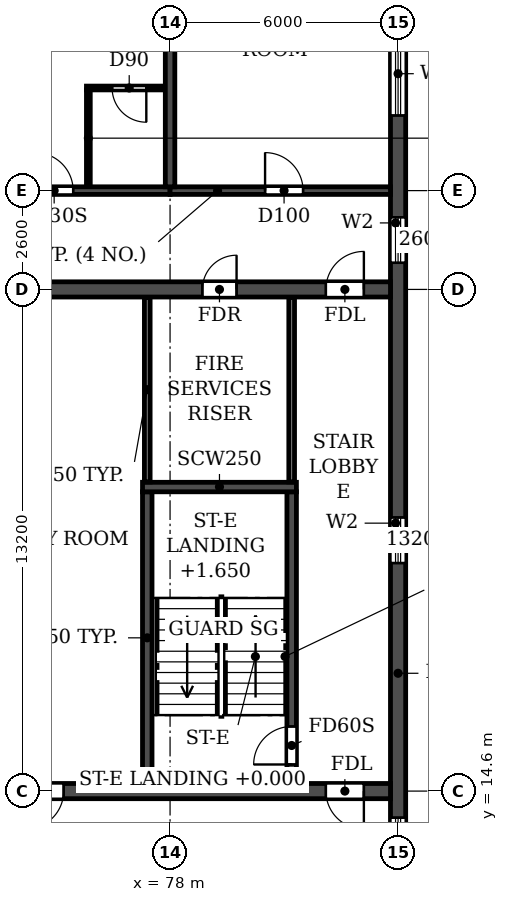
"""IFC4 building model, lengths in metres.
Left out: names, types, materials, properties, quantities, classifications, styles, units other than length and angle.
Written with IfcOpenShell. Run it as: python <this file> out.ifc"""

import sys

from ifc_helpers import new_model, si_unit, direction, frame, frame_2d, origin, place, context, subcontext, project, spatial, rectangle, extrude, element, fill, save


model = new_model("IFC4")
c1 = context("Model", 3, precision=1e-05, world=origin(), true_north=direction((0.0, 1.0)))
c2 = subcontext(c1, "Body", "Model", "MODEL_VIEW")
j1 = project(units=[si_unit("LENGTHUNIT", "METRE"), si_unit("PLANEANGLEUNIT", "RADIAN")], contexts=[c1])
p1 = place(None, origin())
s1 = spatial("IfcSite", under=j1, at=p1, CompositionType="ELEMENT")
p2 = place(p1, origin())
s2 = spatial("IfcBuilding", under=s1, at=p2, CompositionType="ELEMENT")
p3 = place(p2, frame((0.0, 0.0, 171.9)))
s3 = spatial("IfcBuildingStorey", under=s2, at=p3, CompositionType="ELEMENT", Elevation=171.9)
p4 = place(p3, frame((78.0, 30.5, 0.0), z_axis=(0.0, 0.0, 1.0), x_axis=(0.0, 1.0, 0.0)))
e1 = element("IfcWall", 1, at=p4, inside=s3, PredefinedType="SHEAR", context=c2, shape_type="SweptSolid", body=[
    extrude(rectangle(XDim=10.5, YDim=0.25, at=frame_2d((5.25, 0.0))), origin(), (0.0, 0.0, 1.0), 3.08),
])
p5 = place(p3, frame((84.0, 4.683, 0.0), z_axis=(0.0, 0.0, 1.0), x_axis=(0.0, 1.0, 0.0)))
e2 = element("IfcWall", 2, at=p5, inside=s3, PredefinedType="SHEAR", context=c2, shape_type="SweptSolid", body=[
    extrude(rectangle(XDim=31.834, YDim=0.4, at=frame_2d((15.917, 0.0))), origin(), (0.0, 0.0, 1.0), 3.08),
])
p6 = place(p5, frame((23.817, 0.0, 0.9)))
e3 = element("IfcOpeningElement", 3, at=p6, cuts=e2, PredefinedType="OPENING", context=c2, shape_type="SweptSolid", body=[
    extrude(rectangle(XDim=1.2, YDim=1.5, at=frame_2d((0.6, 0.75))), frame((0.0, 0.21, 0.0), z_axis=(0.0, -1.0, 0.0), x_axis=(1.0, 0.0, 0.0)), (0.0, 0.0, 1.0), 0.42),
])
p7 = place(p5, frame((8.017, 0.0, 0.9)))
e4 = element("IfcOpeningElement", 4, at=p7, cuts=e2, PredefinedType="OPENING", context=c2, shape_type="SweptSolid", body=[
    extrude(rectangle(XDim=1.2, YDim=1.5, at=frame_2d((0.6, 0.75))), frame((0.0, 0.21, 0.0), z_axis=(0.0, -1.0, 0.0), x_axis=(1.0, 0.0, 0.0)), (0.0, 0.0, 1.0), 0.42),
])
p8 = place(p5, frame((27.694, 0.0, 0.6)))
e5 = element("IfcOpeningElement", 5, at=p8, cuts=e2, PredefinedType="OPENING", context=c2, shape_type="SweptSolid", body=[
    extrude(rectangle(XDim=2.2, YDim=1.8, at=frame_2d((1.1, 0.9))), frame((0.0, 0.21, 0.0), z_axis=(0.0, -1.0, 0.0), x_axis=(1.0, 0.0, 0.0)), (0.0, 0.0, 1.0), 0.42),
])
p9 = place(p5, frame((2.541, 0.0, 0.6)))
e6 = element("IfcOpeningElement", 6, at=p9, cuts=e2, PredefinedType="OPENING", context=c2, shape_type="SweptSolid", body=[
    extrude(rectangle(XDim=2.2, YDim=1.8, at=frame_2d((1.1, 0.9))), frame((0.0, 0.21, 0.0), z_axis=(0.0, -1.0, 0.0), x_axis=(1.0, 0.0, 0.0)), (0.0, 0.0, 1.0), 0.42),
])
p10 = place(p5, frame((15.917, 0.0, 0.9)))
e7 = element("IfcOpeningElement", 7, at=p10, cuts=e2, PredefinedType="OPENING", context=c2, shape_type="SweptSolid", body=[
    extrude(rectangle(XDim=1.2, YDim=1.5, at=frame_2d((0.6, 0.75))), frame((0.0, 0.21, 0.0), z_axis=(0.0, -1.0, 0.0), x_axis=(1.0, 0.0, 0.0)), (0.0, 0.0, 1.0), 0.42),
])
p11 = place(p3, frame((72.0, 30.4, 0.0), z_axis=(0.0, 0.0, 1.0), x_axis=(1.0, 0.0, 0.0)))
e8 = element("IfcWall", 8, at=p11, inside=s3, PredefinedType="SHEAR", context=c2, shape_type="SweptSolid", body=[
    extrude(rectangle(XDim=6.0, YDim=0.2, at=frame_2d((3.0, 0.0))), origin(), (0.0, 0.0, 1.0), 2.48),
])
p12 = place(p11, frame((2.45, 0.0, 0.0)))
e9 = element("IfcOpeningElement", 9, at=p12, cuts=e8, PredefinedType="OPENING", context=c2, shape_type="SweptSolid", body=[
    extrude(rectangle(XDim=1.0, YDim=2.1, at=frame_2d((0.5, 1.05))), frame((0.0, 0.11, 0.0), z_axis=(0.0, -1.0, 0.0), x_axis=(1.0, 0.0, 0.0)), (0.0, 0.0, 1.0), 0.22),
])
p13 = place(p3, frame((78.0, 30.4, 0.0), z_axis=(0.0, 0.0, 1.0), x_axis=(1.0, 0.0, 0.0)))
e10 = element("IfcWall", 10, at=p13, inside=s3, PredefinedType="SHEAR", context=c2, shape_type="SweptSolid", body=[
    extrude(rectangle(XDim=5.8, YDim=0.2, at=frame_2d((2.9, 0.0))), origin(), (0.0, 0.0, 1.0), 2.48),
])
p14 = place(p13, frame((2.5, 0.0, 0.0)))
e11 = element("IfcOpeningElement", 11, at=p14, cuts=e10, PredefinedType="OPENING", context=c2, shape_type="SweptSolid", body=[
    extrude(rectangle(XDim=1.0, YDim=2.1, at=frame_2d((0.5, 1.05))), frame((0.0, 0.11, 0.0), z_axis=(0.0, -1.0, 0.0), x_axis=(1.0, 0.0, 0.0)), (0.0, 0.0, 1.0), 0.22),
])
p15 = place(p3, frame((18.2, 14.6, 0.0), z_axis=(0.0, 0.0, 1.0), x_axis=(1.0, 0.0, 0.0)))
e12 = element("IfcWall", 12, at=p15, inside=s3, PredefinedType="SOLIDWALL", context=c2, shape_type="SweptSolid", body=[
    extrude(rectangle(XDim=65.6, YDim=0.4, at=frame_2d((32.8, 0.0))), origin(), (0.0, 0.0, 1.0), 3.08),
])
p16 = place(p15, frame((0.7, 0.0, 0.0)))
e13 = element("IfcOpeningElement", 13, at=p16, cuts=e12, PredefinedType="OPENING", context=c2, shape_type="SweptSolid", body=[
    extrude(rectangle(XDim=1.0, YDim=2.1, at=frame_2d((0.5, 1.05))), frame((0.0, 0.21, 0.0), z_axis=(0.0, -1.0, 0.0), x_axis=(1.0, 0.0, 0.0)), (0.0, 0.0, 1.0), 0.42),
])
p17 = place(p15, frame((8.6, 0.0, 0.0)))
e14 = element("IfcOpeningElement", 14, at=p17, cuts=e12, PredefinedType="OPENING", context=c2, shape_type="SweptSolid", body=[
    extrude(rectangle(XDim=1.0, YDim=2.1, at=frame_2d((0.5, 1.05))), frame((0.0, 0.21, 0.0), z_axis=(0.0, -1.0, 0.0), x_axis=(1.0, 0.0, 0.0)), (0.0, 0.0, 1.0), 0.42),
])
p18 = place(p15, frame((13.2, 0.0, 0.0)))
e15 = element("IfcOpeningElement", 15, at=p18, cuts=e12, PredefinedType="OPENING", context=c2, shape_type="SweptSolid", body=[
    extrude(rectangle(XDim=1.0, YDim=2.1, at=frame_2d((0.5, 1.05))), frame((0.0, 0.21, 0.0), z_axis=(0.0, -1.0, 0.0), x_axis=(1.0, 0.0, 0.0)), (0.0, 0.0, 1.0), 0.42),
])
p19 = place(p15, frame((25.8, 0.0, 0.0)))
e16 = element("IfcOpeningElement", 16, at=p19, cuts=e12, PredefinedType="OPENING", context=c2, shape_type="SweptSolid", body=[
    extrude(rectangle(XDim=1.0, YDim=2.1, at=frame_2d((0.5, 1.05))), frame((0.0, 0.21, 0.0), z_axis=(0.0, -1.0, 0.0), x_axis=(1.0, 0.0, 0.0)), (0.0, 0.0, 1.0), 0.42),
])
p20 = place(p15, frame((29.7, 0.0, 0.0)))
e17 = element("IfcOpeningElement", 17, at=p20, cuts=e12, PredefinedType="OPENING", context=c2, shape_type="SweptSolid", body=[
    extrude(rectangle(XDim=1.0, YDim=2.1, at=frame_2d((0.5, 1.05))), frame((0.0, 0.21, 0.0), z_axis=(0.0, -1.0, 0.0), x_axis=(1.0, 0.0, 0.0)), (0.0, 0.0, 1.0), 0.42),
])
p21 = place(p15, frame((32.3, 0.0, 0.0)))
e18 = element("IfcOpeningElement", 18, at=p21, cuts=e12, PredefinedType="OPENING", context=c2, shape_type="SweptSolid", body=[
    extrude(rectangle(XDim=1.0, YDim=2.1, at=frame_2d((0.5, 1.05))), frame((0.0, 0.21, 0.0), z_axis=(0.0, -1.0, 0.0), x_axis=(1.0, 0.0, 0.0)), (0.0, 0.0, 1.0), 0.42),
])
p22 = place(p15, frame((37.5, 0.0, 0.0)))
e19 = element("IfcOpeningElement", 19, at=p22, cuts=e12, PredefinedType="OPENING", context=c2, shape_type="SweptSolid", body=[
    extrude(rectangle(XDim=1.0, YDim=2.1, at=frame_2d((0.5, 1.05))), frame((0.0, 0.21, 0.0), z_axis=(0.0, -1.0, 0.0), x_axis=(1.0, 0.0, 0.0)), (0.0, 0.0, 1.0), 0.42),
])
p23 = place(p15, frame((51.4, 0.0, 0.0)))
e20 = element("IfcOpeningElement", 20, at=p23, cuts=e12, PredefinedType="OPENING", context=c2, shape_type="SweptSolid", body=[
    extrude(rectangle(XDim=1.0, YDim=2.1, at=frame_2d((0.5, 1.05))), frame((0.0, 0.21, 0.0), z_axis=(0.0, -1.0, 0.0), x_axis=(1.0, 0.0, 0.0)), (0.0, 0.0, 1.0), 0.42),
])
p24 = place(p15, frame((56.0, 0.0, 0.0)))
e21 = element("IfcOpeningElement", 21, at=p24, cuts=e12, PredefinedType="OPENING", context=c2, shape_type="SweptSolid", body=[
    extrude(rectangle(XDim=1.0, YDim=2.1, at=frame_2d((0.5, 1.05))), frame((0.0, 0.21, 0.0), z_axis=(0.0, -1.0, 0.0), x_axis=(1.0, 0.0, 0.0)), (0.0, 0.0, 1.0), 0.42),
])
p25 = place(p15, frame((63.9, 0.0, 0.0)))
e22 = element("IfcOpeningElement", 22, at=p25, cuts=e12, PredefinedType="OPENING", context=c2, shape_type="SweptSolid", body=[
    extrude(rectangle(XDim=1.0, YDim=2.1, at=frame_2d((0.5, 1.05))), frame((0.0, 0.21, 0.0), z_axis=(0.0, -1.0, 0.0), x_axis=(1.0, 0.0, 0.0)), (0.0, 0.0, 1.0), 0.42),
])
p26 = place(p3, frame((18.2, 27.8, 0.0), z_axis=(0.0, 0.0, 1.0), x_axis=(1.0, 0.0, 0.0)))
e23 = element("IfcWall", 23, at=p26, inside=s3, PredefinedType="SOLIDWALL", context=c2, shape_type="SweptSolid", body=[
    extrude(rectangle(XDim=65.6, YDim=0.4, at=frame_2d((32.8, 0.0))), origin(), (0.0, 0.0, 1.0), 3.08),
])
p27 = place(p26, frame((0.7, 0.0, 0.0)))
e24 = element("IfcOpeningElement", 24, at=p27, cuts=e23, PredefinedType="OPENING", context=c2, shape_type="SweptSolid", body=[
    extrude(rectangle(XDim=1.0, YDim=2.1, at=frame_2d((0.5, 1.05))), frame((0.0, 0.21, 0.0), z_axis=(0.0, -1.0, 0.0), x_axis=(1.0, 0.0, 0.0)), (0.0, 0.0, 1.0), 0.42),
])
p28 = place(p26, frame((4.05, 0.0, 0.0)))
e25 = element("IfcOpeningElement", 25, at=p28, cuts=e23, PredefinedType="OPENING", context=c2, shape_type="SweptSolid", body=[
    extrude(rectangle(XDim=0.9, YDim=2.1, at=frame_2d((0.45, 1.05))), frame((0.0, 0.21, 0.0), z_axis=(0.0, -1.0, 0.0), x_axis=(1.0, 0.0, 0.0)), (0.0, 0.0, 1.0), 0.42),
])
p29 = place(p26, frame((13.25, 0.0, 0.0)))
e26 = element("IfcOpeningElement", 26, at=p29, cuts=e23, PredefinedType="OPENING", context=c2, shape_type="SweptSolid", body=[
    extrude(rectangle(XDim=0.9, YDim=2.1, at=frame_2d((0.45, 1.05))), frame((0.0, 0.21, 0.0), z_axis=(0.0, -1.0, 0.0), x_axis=(1.0, 0.0, 0.0)), (0.0, 0.0, 1.0), 0.42),
])
p30 = place(p26, frame((17.7, 0.0, 0.0)))
e27 = element("IfcOpeningElement", 27, at=p30, cuts=e23, PredefinedType="OPENING", context=c2, shape_type="SweptSolid", body=[
    extrude(rectangle(XDim=1.0, YDim=2.1, at=frame_2d((0.5, 1.05))), frame((0.0, 0.21, 0.0), z_axis=(0.0, -1.0, 0.0), x_axis=(1.0, 0.0, 0.0)), (0.0, 0.0, 1.0), 0.42),
])
p31 = place(p26, frame((22.9, 0.0, 0.0)))
e28 = element("IfcOpeningElement", 28, at=p31, cuts=e23, PredefinedType="OPENING", context=c2, shape_type="SweptSolid", body=[
    extrude(rectangle(XDim=1.0, YDim=2.1, at=frame_2d((0.5, 1.05))), frame((0.0, 0.21, 0.0), z_axis=(0.0, -1.0, 0.0), x_axis=(1.0, 0.0, 0.0)), (0.0, 0.0, 1.0), 0.42),
])
p32 = place(p26, frame((29.4, 0.0, 0.0)))
e29 = element("IfcOpeningElement", 29, at=p32, cuts=e23, PredefinedType="OPENING", context=c2, shape_type="SweptSolid", body=[
    extrude(rectangle(XDim=1.0, YDim=2.1, at=frame_2d((0.5, 1.05))), frame((0.0, 0.21, 0.0), z_axis=(0.0, -1.0, 0.0), x_axis=(1.0, 0.0, 0.0)), (0.0, 0.0, 1.0), 0.42),
])
p33 = place(p26, frame((32.3, 0.0, 0.0)))
e30 = element("IfcOpeningElement", 30, at=p33, cuts=e23, PredefinedType="OPENING", context=c2, shape_type="SweptSolid", body=[
    extrude(rectangle(XDim=1.0, YDim=2.1, at=frame_2d((0.5, 1.05))), frame((0.0, 0.21, 0.0), z_axis=(0.0, -1.0, 0.0), x_axis=(1.0, 0.0, 0.0)), (0.0, 0.0, 1.0), 0.42),
])
p34 = place(p26, frame((36.5, 0.0, 0.0)))
e31 = element("IfcOpeningElement", 31, at=p34, cuts=e23, PredefinedType="OPENING", context=c2, shape_type="SweptSolid", body=[
    extrude(rectangle(XDim=1.0, YDim=2.1, at=frame_2d((0.5, 1.05))), frame((0.0, 0.21, 0.0), z_axis=(0.0, -1.0, 0.0), x_axis=(1.0, 0.0, 0.0)), (0.0, 0.0, 1.0), 0.42),
])
p35 = place(p26, frame((41.7, 0.0, 0.0)))
e32 = element("IfcOpeningElement", 32, at=p35, cuts=e23, PredefinedType="OPENING", context=c2, shape_type="SweptSolid", body=[
    extrude(rectangle(XDim=1.0, YDim=2.1, at=frame_2d((0.5, 1.05))), frame((0.0, 0.21, 0.0), z_axis=(0.0, -1.0, 0.0), x_axis=(1.0, 0.0, 0.0)), (0.0, 0.0, 1.0), 0.42),
])
p36 = place(p26, frame((45.6, 0.0, 0.0)))
e33 = element("IfcOpeningElement", 33, at=p36, cuts=e23, PredefinedType="OPENING", context=c2, shape_type="SweptSolid", body=[
    extrude(rectangle(XDim=1.0, YDim=2.1, at=frame_2d((0.5, 1.05))), frame((0.0, 0.21, 0.0), z_axis=(0.0, -1.0, 0.0), x_axis=(1.0, 0.0, 0.0)), (0.0, 0.0, 1.0), 0.42),
])
p37 = place(p26, frame((48.2, 0.0, 0.0)))
e34 = element("IfcOpeningElement", 34, at=p37, cuts=e23, PredefinedType="OPENING", context=c2, shape_type="SweptSolid", body=[
    extrude(rectangle(XDim=1.0, YDim=2.1, at=frame_2d((0.5, 1.05))), frame((0.0, 0.21, 0.0), z_axis=(0.0, -1.0, 0.0), x_axis=(1.0, 0.0, 0.0)), (0.0, 0.0, 1.0), 0.42),
])
p38 = place(p26, frame((51.45, 0.0, 0.0)))
e35 = element("IfcOpeningElement", 35, at=p38, cuts=e23, PredefinedType="OPENING", context=c2, shape_type="SweptSolid", body=[
    extrude(rectangle(XDim=0.9, YDim=2.1, at=frame_2d((0.45, 1.05))), frame((0.0, 0.21, 0.0), z_axis=(0.0, -1.0, 0.0), x_axis=(1.0, 0.0, 0.0)), (0.0, 0.0, 1.0), 0.42),
])
p39 = place(p26, frame((60.65, 0.0, 0.0)))
e36 = element("IfcOpeningElement", 36, at=p39, cuts=e23, PredefinedType="OPENING", context=c2, shape_type="SweptSolid", body=[
    extrude(rectangle(XDim=0.9, YDim=2.1, at=frame_2d((0.45, 1.05))), frame((0.0, 0.21, 0.0), z_axis=(0.0, -1.0, 0.0), x_axis=(1.0, 0.0, 0.0)), (0.0, 0.0, 1.0), 0.42),
])
p40 = place(p26, frame((63.9, 0.0, 0.0)))
e37 = element("IfcOpeningElement", 37, at=p40, cuts=e23, PredefinedType="OPENING", context=c2, shape_type="SweptSolid", body=[
    extrude(rectangle(XDim=1.0, YDim=2.1, at=frame_2d((0.5, 1.05))), frame((0.0, 0.21, 0.0), z_axis=(0.0, -1.0, 0.0), x_axis=(1.0, 0.0, 0.0)), (0.0, 0.0, 1.0), 0.42),
])
p41 = place(p3, frame((77.4, 14.8, 0.0), z_axis=(0.0, 0.0, 1.0), x_axis=(0.0, 1.0, 0.0)))
e38 = element("IfcWall", 38, at=p41, inside=s3, PredefinedType="SOLIDWALL", context=c2, shape_type="SweptSolid", body=[
    extrude(rectangle(XDim=7.675, YDim=0.25, at=frame_2d((3.837, 0.0))), origin(), (0.0, 0.0, 1.0), 3.08),
])
p42 = place(p3, frame((81.2, 14.8, 0.0), z_axis=(0.0, 0.0, 1.0), x_axis=(0.0, 1.0, 0.0)))
e39 = element("IfcWall", 39, at=p42, inside=s3, PredefinedType="SOLIDWALL", context=c2, shape_type="SweptSolid", body=[
    extrude(rectangle(XDim=7.675, YDim=0.25, at=frame_2d((3.837, 0.0))), origin(), (0.0, 0.0, 1.0), 3.08),
])
p43 = place(p42, frame((0.5, 0.0, 0.0)))
e40 = element("IfcOpeningElement", 40, at=p43, cuts=e39, PredefinedType="OPENING", context=c2, shape_type="SweptSolid", body=[
    extrude(rectangle(XDim=1.0, YDim=2.1, at=frame_2d((0.5, 1.05))), frame((0.0, 0.135, 0.0), z_axis=(0.0, -1.0, 0.0), x_axis=(1.0, 0.0, 0.0)), (0.0, 0.0, 1.0), 0.27),
])
p44 = place(p3, frame((77.275, 22.6, 0.0), z_axis=(0.0, 0.0, 1.0), x_axis=(1.0, 0.0, 0.0)))
e41 = element("IfcWall", 41, at=p44, inside=s3, PredefinedType="SOLIDWALL", context=c2, shape_type="SweptSolid", body=[
    extrude(rectangle(XDim=4.05, YDim=0.25, at=frame_2d((2.025, 0.0))), origin(), (0.0, 0.0, 1.0), 3.08),
])
p45 = place(p3, frame((75.8, 33.1, 0.0), z_axis=(0.0, 0.0, 1.0), x_axis=(1.0, 0.0, 0.0)))
e42 = element("IfcWall", 42, at=p45, inside=s3, PredefinedType="PARTITIONING", context=c2, shape_type="SweptSolid", body=[
    extrude(rectangle(XDim=2.065, YDim=0.1, at=frame_2d((1.032, 0.0))), origin(), (0.0, 0.0, 1.0), 3.08),
])
p46 = place(p45, frame((0.675, 0.0, 0.0)))
e43 = element("IfcOpeningElement", 43, at=p46, cuts=e42, PredefinedType="OPENING", context=c2, shape_type="SweptSolid", body=[
    extrude(rectangle(XDim=0.9, YDim=2.1, at=frame_2d((0.45, 1.05))), frame((0.0, 0.06, 0.0), z_axis=(0.0, -1.0, 0.0), x_axis=(1.0, 0.0, 0.0)), (0.0, 0.0, 1.0), 0.12),
])
p47 = place(p3, frame((75.85, 30.51, 0.0), z_axis=(0.0, 0.0, 1.0), x_axis=(0.0, 1.0, 0.0)))
e44 = element("IfcWall", 44, at=p47, inside=s3, PredefinedType="PARTITIONING", context=c2, shape_type="SweptSolid", body=[
    extrude(rectangle(XDim=2.54, YDim=0.1, at=frame_2d((1.27, 0.0))), origin(), (0.0, 0.0, 1.0), 3.08),
])
for number, where, z_axis, x_axis in (
    (45, (77.4, 22.735, 0.0), (0.0, 0.0, 1.0), (0.0, 1.0, 0.0)),
    (46, (81.2, 22.735, 0.0), (0.0, 0.0, 1.0), (0.0, 1.0, 0.0)),
):
    element("IfcWall", number, at=place(p3, frame(where, z_axis=z_axis, x_axis=x_axis)), inside=s3, PredefinedType="PARTITIONING", context=c2, shape_type="SweptSolid", body=[
        extrude(rectangle(XDim=4.855, YDim=0.15, at=frame_2d((2.427, 0.0))), origin(), (0.0, 0.0, 1.0), 3.08),
    ])
p48 = place(p6, origin())
e47 = element("IfcWindow", 47, at=p48, inside=s3, PartitioningType="SINGLE_PANEL", PredefinedType="WINDOW", context=c2, shape_type="SweptSolid", body=[
    extrude(rectangle(XDim=1.2, YDim=1.5, at=frame_2d((0.6, 0.75))), frame((0.0, 0.03, 0.0), z_axis=(0.0, -1.0, 0.0), x_axis=(1.0, 0.0, 0.0)), (0.0, 0.0, 1.0), 0.06),
])
fill(e3, e47)
p49 = place(p7, origin())
e48 = element("IfcWindow", 48, at=p49, inside=s3, PartitioningType="SINGLE_PANEL", PredefinedType="WINDOW", context=c2, shape_type="SweptSolid", body=[
    extrude(rectangle(XDim=1.2, YDim=1.5, at=frame_2d((0.6, 0.75))), frame((0.0, 0.03, 0.0), z_axis=(0.0, -1.0, 0.0), x_axis=(1.0, 0.0, 0.0)), (0.0, 0.0, 1.0), 0.06),
])
fill(e4, e48)
p50 = place(p8, origin())
e49 = element("IfcWindow", 49, at=p50, inside=s3, PartitioningType="DOUBLE_PANEL_HORIZONTAL", PredefinedType="WINDOW", context=c2, shape_type="SweptSolid", body=[
    extrude(rectangle(XDim=2.2, YDim=1.8, at=frame_2d((1.1, 0.9))), frame((0.0, 0.03, 0.0), z_axis=(0.0, -1.0, 0.0), x_axis=(1.0, 0.0, 0.0)), (0.0, 0.0, 1.0), 0.06),
])
fill(e5, e49)
p51 = place(p10, origin())
e50 = element("IfcWindow", 50, at=p51, inside=s3, PartitioningType="SINGLE_PANEL", PredefinedType="WINDOW", context=c2, shape_type="SweptSolid", body=[
    extrude(rectangle(XDim=1.2, YDim=1.5, at=frame_2d((0.6, 0.75))), frame((0.0, 0.03, 0.0), z_axis=(0.0, -1.0, 0.0), x_axis=(1.0, 0.0, 0.0)), (0.0, 0.0, 1.0), 0.06),
])
fill(e7, e50)
p52 = place(p39, origin())
e51 = element("IfcDoor", 51, at=p52, inside=s3, OperationType="SINGLE_SWING_RIGHT", PredefinedType="DOOR", context=c2, shape_type="SweptSolid", body=[
    extrude(rectangle(XDim=0.9, YDim=2.1, at=frame_2d((0.45, 1.05))), frame((0.0, 0.025, 0.0), z_axis=(0.0, -1.0, 0.0), x_axis=(1.0, 0.0, 0.0)), (0.0, 0.0, 1.0), 0.05),
])
fill(e36, e51)
p53 = place(p40, origin())
e52 = element("IfcDoor", 52, at=p53, inside=s3, OperationType="SINGLE_SWING_RIGHT", PredefinedType="DOOR", context=c2, shape_type="SweptSolid", body=[
    extrude(rectangle(XDim=1.0, YDim=2.1, at=frame_2d((0.5, 1.05))), frame((0.0, 0.025, 0.0), z_axis=(0.0, -1.0, 0.0), x_axis=(1.0, 0.0, 0.0)), (0.0, 0.0, 1.0), 0.05),
])
fill(e37, e52)
p54 = place(p24, frame((1.0, 0.0, 0.0), z_axis=(0.0, 0.0, 1.0), x_axis=(-1.0, 0.0, 0.0)))
e53 = element("IfcDoor", 53, at=p54, inside=s3, OperationType="SINGLE_SWING_RIGHT", PredefinedType="DOOR", context=c2, shape_type="SweptSolid", body=[
    extrude(rectangle(XDim=1.0, YDim=2.1, at=frame_2d((0.5, 1.05))), frame((0.0, 0.025, 0.0), z_axis=(0.0, -1.0, 0.0), x_axis=(1.0, 0.0, 0.0)), (0.0, 0.0, 1.0), 0.05),
])
fill(e21, e53)
p55 = place(p25, frame((1.0, 0.0, 0.0), z_axis=(0.0, 0.0, 1.0), x_axis=(-1.0, 0.0, 0.0)))
e54 = element("IfcDoor", 54, at=p55, inside=s3, OperationType="SINGLE_SWING_LEFT", PredefinedType="DOOR", context=c2, shape_type="SweptSolid", body=[
    extrude(rectangle(XDim=1.0, YDim=2.1, at=frame_2d((0.5, 1.05))), frame((0.0, 0.025, 0.0), z_axis=(0.0, -1.0, 0.0), x_axis=(1.0, 0.0, 0.0)), (0.0, 0.0, 1.0), 0.05),
])
fill(e22, e54)
p56 = place(p12, origin())
e55 = element("IfcDoor", 55, at=p56, inside=s3, OperationType="SINGLE_SWING_LEFT", PredefinedType="DOOR", context=c2, shape_type="SweptSolid", body=[
    extrude(rectangle(XDim=1.0, YDim=2.1, at=frame_2d((0.5, 1.05))), frame((0.0, 0.025, 0.0), z_axis=(0.0, -1.0, 0.0), x_axis=(1.0, 0.0, 0.0)), (0.0, 0.0, 1.0), 0.05),
])
fill(e9, e55)
p57 = place(p46, frame((0.9, 0.0, 0.0), z_axis=(0.0, 0.0, 1.0), x_axis=(-1.0, 0.0, 0.0)))
e56 = element("IfcDoor", 56, at=p57, inside=s3, OperationType="SINGLE_SWING_LEFT", PredefinedType="DOOR", context=c2, shape_type="SweptSolid", body=[
    extrude(rectangle(XDim=0.9, YDim=2.1, at=frame_2d((0.45, 1.05))), frame((0.0, 0.025, 0.0), z_axis=(0.0, -1.0, 0.0), x_axis=(1.0, 0.0, 0.0)), (0.0, 0.0, 1.0), 0.05),
])
fill(e43, e56)
p58 = place(p14, origin())
e57 = element("IfcDoor", 57, at=p58, inside=s3, OperationType="SINGLE_SWING_LEFT", PredefinedType="DOOR", context=c2, shape_type="SweptSolid", body=[
    extrude(rectangle(XDim=1.0, YDim=2.1, at=frame_2d((0.5, 1.05))), frame((0.0, 0.025, 0.0), z_axis=(0.0, -1.0, 0.0), x_axis=(1.0, 0.0, 0.0)), (0.0, 0.0, 1.0), 0.05),
])
fill(e11, e57)
p59 = place(p43, origin())
e58 = element("IfcDoor", 58, at=p59, inside=s3, OperationType="SINGLE_SWING_LEFT", PredefinedType="DOOR", context=c2, shape_type="SweptSolid", body=[
    extrude(rectangle(XDim=1.0, YDim=2.1, at=frame_2d((0.5, 1.05))), frame((0.0, 0.025, 0.0), z_axis=(0.0, -1.0, 0.0), x_axis=(1.0, 0.0, 0.0)), (0.0, 0.0, 1.0), 0.05),
])
fill(e40, e58)
save(model, sys.argv[1])
